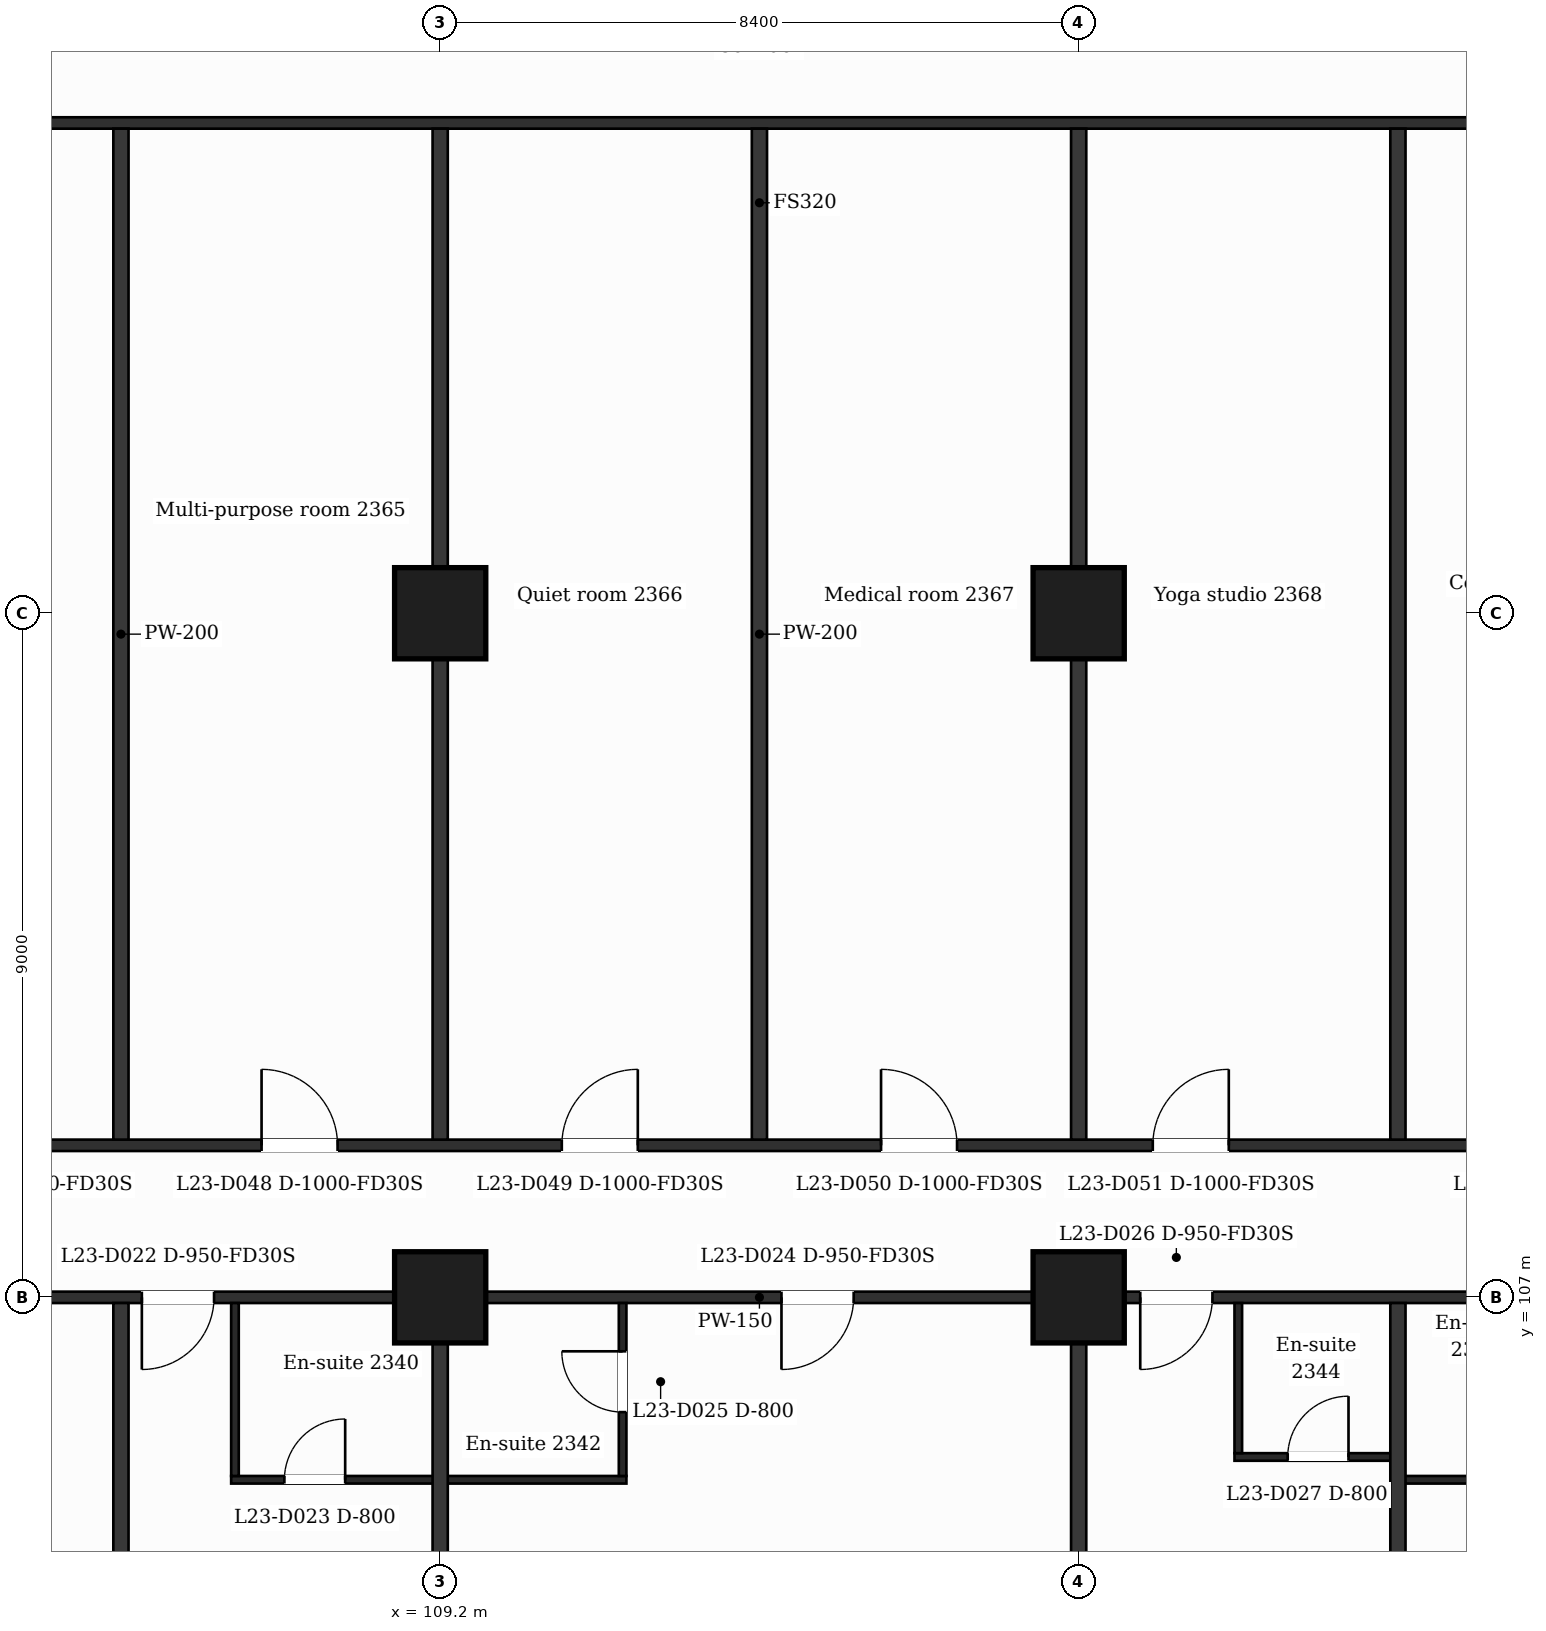
"""IFC4 building model, lengths in metres.
Left out: names, types, materials, properties, quantities, classifications, styles, units other than length and angle.
Written with IfcOpenShell. Run it as: python <this file> out.ifc"""

import sys

from ifc_helpers import new_model, si_unit, direction, frame, frame_2d, origin, origin_2d, place, context, subcontext, project, spatial, rectangle, extrude, element, fill, save


model = new_model("IFC4")
c1 = context("Model", 3, precision=1e-05, world=origin(), true_north=direction((0.0, 1.0)))
c2 = subcontext(c1, "Body", "Model", "MODEL_VIEW")
j1 = project(units=[si_unit("LENGTHUNIT", "METRE"), si_unit("PLANEANGLEUNIT", "RADIAN")], contexts=[c1])
p1 = place(None, origin())
s1 = spatial("IfcSite", under=j1, at=p1, CompositionType="ELEMENT")
p2 = place(p1, origin())
s2 = spatial("IfcBuilding", under=s1, at=p2, CompositionType="ELEMENT")
p3 = place(p2, frame((0.0, 0.0, 102.1)))
s3 = spatial("IfcBuildingStorey", under=s2, at=p3, CompositionType="ELEMENT", Elevation=102.1)
for number, where, z_axis, x_axis in (
    (1, (109.2, 107.0, 0.0), (0.0, 0.0, 1.0), (1.0, 0.0, 0.0)),
    (2, (117.6, 107.0, 0.0), (0.0, 0.0, 1.0), (1.0, 0.0, 0.0)),
    (3, (109.2, 116.0, 0.0), (0.0, 0.0, 1.0), (1.0, 0.0, 0.0)),
    (4, (117.6, 116.0, 0.0), (0.0, 0.0, 1.0), (1.0, 0.0, 0.0)),
):
    element("IfcColumn", number, at=place(p3, frame(where, z_axis=z_axis, x_axis=x_axis)), inside=s3, PredefinedType="COLUMN", context=c2, shape_type="SweptSolid", body=[
        extrude(rectangle(XDim=1.2, YDim=1.2, at=origin_2d()), origin(), (0.0, 0.0, 1.0), 3.7),
    ])
p4 = place(p3, frame((106.45, 104.6, 0.0), z_axis=(0.0, 0.0, 1.0), x_axis=(1.0, 0.0, 0.0)))
e5 = element("IfcWall", 5, at=p4, inside=s3, PredefinedType="PARTITIONING", context=c2, shape_type="SweptSolid", body=[
    extrude(rectangle(XDim=5.2, YDim=0.1, at=frame_2d((2.6, 0.0))), origin(), (0.0, 0.0, 1.0), 3.38),
])
p5 = place(p4, frame((0.7, 0.0, 0.0)))
e6 = element("IfcOpeningElement", 6, at=p5, cuts=e5, PredefinedType="OPENING", context=c2, shape_type="SweptSolid", body=[
    extrude(rectangle(XDim=0.8, YDim=2.1, at=frame_2d((0.4, 1.05))), frame((0.0, 0.06, 0.0), z_axis=(0.0, -1.0, 0.0), x_axis=(1.0, 0.0, 0.0)), (0.0, 0.0, 1.0), 0.12),
])
p6 = place(p3, frame((121.8, 104.6, 0.0), z_axis=(0.0, 0.0, 1.0), x_axis=(1.0, 0.0, 0.0)))
e7 = element("IfcWall", 7, at=p6, inside=s3, PredefinedType="PARTITIONING", context=c2, shape_type="SweptSolid", body=[
    extrude(rectangle(XDim=1.85, YDim=0.1, at=frame_2d((0.925, 0.0))), origin(), (0.0, 0.0, 1.0), 3.38),
])
p7 = place(p3, frame((119.65, 104.9, 0.0), z_axis=(0.0, 0.0, 1.0), x_axis=(1.0, 0.0, 0.0)))
e8 = element("IfcWall", 8, at=p7, inside=s3, PredefinedType="PARTITIONING", context=c2, shape_type="SweptSolid", body=[
    extrude(rectangle(XDim=2.15, YDim=0.1, at=frame_2d((1.075, 0.0))), origin(), (0.0, 0.0, 1.0), 3.38),
])
p8 = place(p7, frame((0.7, 0.0, 0.0)))
e9 = element("IfcOpeningElement", 9, at=p8, cuts=e8, PredefinedType="OPENING", context=c2, shape_type="SweptSolid", body=[
    extrude(rectangle(XDim=0.8, YDim=2.1, at=frame_2d((0.4, 1.05))), frame((0.0, 0.06, 0.0), z_axis=(0.0, -1.0, 0.0), x_axis=(1.0, 0.0, 0.0)), (0.0, 0.0, 1.0), 0.12),
])
p9 = place(p3, frame((87.018, 107.0, 0.0), z_axis=(0.0, 0.0, 1.0), x_axis=(1.0, 0.0, 0.0)))
e10 = element("IfcWall", 10, at=p9, inside=s3, PredefinedType="PARTITIONING", context=c2, shape_type="SweptSolid", body=[
    extrude(rectangle(XDim=52.765, YDim=0.15, at=frame_2d((26.382, 0.0))), origin(), (0.0, 0.0, 1.0), 3.38),
])
p10 = place(p9, frame((1.276, 0.0, 0.0)))
e11 = element("IfcOpeningElement", 11, at=p10, cuts=e10, PredefinedType="OPENING", context=c2, shape_type="SweptSolid", body=[
    extrude(rectangle(XDim=0.95, YDim=2.1, at=frame_2d((0.475, 1.05))), frame((0.0, 0.085, 0.0), z_axis=(0.0, -1.0, 0.0), x_axis=(1.0, 0.0, 0.0)), (0.0, 0.0, 1.0), 0.17),
])
p11 = place(p9, frame((6.152, 0.0, 0.0)))
e12 = element("IfcOpeningElement", 12, at=p11, cuts=e10, PredefinedType="OPENING", context=c2, shape_type="SweptSolid", body=[
    extrude(rectangle(XDim=0.95, YDim=2.1, at=frame_2d((0.475, 1.05))), frame((0.0, 0.085, 0.0), z_axis=(0.0, -1.0, 0.0), x_axis=(1.0, 0.0, 0.0)), (0.0, 0.0, 1.0), 0.17),
])
p12 = place(p9, frame((14.59, 0.0, 0.0)))
e13 = element("IfcOpeningElement", 13, at=p12, cuts=e10, PredefinedType="OPENING", context=c2, shape_type="SweptSolid", body=[
    extrude(rectangle(XDim=0.95, YDim=2.1, at=frame_2d((0.475, 1.05))), frame((0.0, 0.085, 0.0), z_axis=(0.0, -1.0, 0.0), x_axis=(1.0, 0.0, 0.0)), (0.0, 0.0, 1.0), 0.17),
])
p13 = place(p9, frame((18.257, 0.0, 0.0)))
e14 = element("IfcOpeningElement", 14, at=p13, cuts=e10, PredefinedType="OPENING", context=c2, shape_type="SweptSolid", body=[
    extrude(rectangle(XDim=0.95, YDim=2.1, at=frame_2d((0.475, 1.05))), frame((0.0, 0.085, 0.0), z_axis=(0.0, -1.0, 0.0), x_axis=(1.0, 0.0, 0.0)), (0.0, 0.0, 1.0), 0.17),
])
p14 = place(p9, frame((26.672, 0.0, 0.0)))
e15 = element("IfcOpeningElement", 15, at=p14, cuts=e10, PredefinedType="OPENING", context=c2, shape_type="SweptSolid", body=[
    extrude(rectangle(XDim=0.95, YDim=2.1, at=frame_2d((0.475, 1.05))), frame((0.0, 0.085, 0.0), z_axis=(0.0, -1.0, 0.0), x_axis=(1.0, 0.0, 0.0)), (0.0, 0.0, 1.0), 0.17),
])
p15 = place(p9, frame((31.392, 0.0, 0.0)))
e16 = element("IfcOpeningElement", 16, at=p15, cuts=e10, PredefinedType="OPENING", context=c2, shape_type="SweptSolid", body=[
    extrude(rectangle(XDim=0.95, YDim=2.1, at=frame_2d((0.475, 1.05))), frame((0.0, 0.085, 0.0), z_axis=(0.0, -1.0, 0.0), x_axis=(1.0, 0.0, 0.0)), (0.0, 0.0, 1.0), 0.17),
])
p16 = place(p9, frame((37.182, 0.0, 0.0)))
e17 = element("IfcOpeningElement", 17, at=p16, cuts=e10, PredefinedType="OPENING", context=c2, shape_type="SweptSolid", body=[
    extrude(rectangle(XDim=0.95, YDim=2.1, at=frame_2d((0.475, 1.05))), frame((0.0, 0.085, 0.0), z_axis=(0.0, -1.0, 0.0), x_axis=(1.0, 0.0, 0.0)), (0.0, 0.0, 1.0), 0.17),
])
p17 = place(p9, frame((41.762, 0.0, 0.0)))
e18 = element("IfcOpeningElement", 18, at=p17, cuts=e10, PredefinedType="OPENING", context=c2, shape_type="SweptSolid", body=[
    extrude(rectangle(XDim=0.95, YDim=2.1, at=frame_2d((0.475, 1.05))), frame((0.0, 0.085, 0.0), z_axis=(0.0, -1.0, 0.0), x_axis=(1.0, 0.0, 0.0)), (0.0, 0.0, 1.0), 0.17),
])
p18 = place(p9, frame((49.285, 0.0, 0.0)))
e19 = element("IfcOpeningElement", 19, at=p18, cuts=e10, PredefinedType="OPENING", context=c2, shape_type="SweptSolid", body=[
    extrude(rectangle(XDim=0.95, YDim=2.1, at=frame_2d((0.475, 1.05))), frame((0.0, 0.085, 0.0), z_axis=(0.0, -1.0, 0.0), x_axis=(1.0, 0.0, 0.0)), (0.0, 0.0, 1.0), 0.17),
])
p19 = place(p3, frame((100.725, 109.0, 0.0), z_axis=(0.0, 0.0, 1.0), x_axis=(1.0, 0.0, 0.0)))
e20 = element("IfcWall", 20, at=p19, inside=s3, PredefinedType="PARTITIONING", context=c2, shape_type="SweptSolid", body=[
    extrude(rectangle(XDim=25.35, YDim=0.15, at=frame_2d((12.675, 0.0))), origin(), (0.0, 0.0, 1.0), 3.38),
])
p20 = place(p19, frame((2.3, 0.0, 0.0)))
e21 = element("IfcOpeningElement", 21, at=p20, cuts=e20, PredefinedType="OPENING", context=c2, shape_type="SweptSolid", body=[
    extrude(rectangle(XDim=1.0, YDim=2.1, at=frame_2d((0.5, 1.05))), frame((0.0, 0.085, 0.0), z_axis=(0.0, -1.0, 0.0), x_axis=(1.0, 0.0, 0.0)), (0.0, 0.0, 1.0), 0.17),
])
p21 = place(p19, frame((6.125, 0.0, 0.0)))
e22 = element("IfcOpeningElement", 22, at=p21, cuts=e20, PredefinedType="OPENING", context=c2, shape_type="SweptSolid", body=[
    extrude(rectangle(XDim=1.0, YDim=2.1, at=frame_2d((0.5, 1.05))), frame((0.0, 0.085, 0.0), z_axis=(0.0, -1.0, 0.0), x_axis=(1.0, 0.0, 0.0)), (0.0, 0.0, 1.0), 0.17),
])
p22 = place(p19, frame((10.075, 0.0, 0.0)))
e23 = element("IfcOpeningElement", 23, at=p22, cuts=e20, PredefinedType="OPENING", context=c2, shape_type="SweptSolid", body=[
    extrude(rectangle(XDim=1.0, YDim=2.1, at=frame_2d((0.5, 1.05))), frame((0.0, 0.085, 0.0), z_axis=(0.0, -1.0, 0.0), x_axis=(1.0, 0.0, 0.0)), (0.0, 0.0, 1.0), 0.17),
])
p23 = place(p19, frame((14.275, 0.0, 0.0)))
e24 = element("IfcOpeningElement", 24, at=p23, cuts=e20, PredefinedType="OPENING", context=c2, shape_type="SweptSolid", body=[
    extrude(rectangle(XDim=1.0, YDim=2.1, at=frame_2d((0.5, 1.05))), frame((0.0, 0.085, 0.0), z_axis=(0.0, -1.0, 0.0), x_axis=(1.0, 0.0, 0.0)), (0.0, 0.0, 1.0), 0.17),
])
p24 = place(p19, frame((17.85, 0.0, 0.0)))
e25 = element("IfcOpeningElement", 25, at=p24, cuts=e20, PredefinedType="OPENING", context=c2, shape_type="SweptSolid", body=[
    extrude(rectangle(XDim=1.0, YDim=2.1, at=frame_2d((0.5, 1.05))), frame((0.0, 0.085, 0.0), z_axis=(0.0, -1.0, 0.0), x_axis=(1.0, 0.0, 0.0)), (0.0, 0.0, 1.0), 0.17),
])
p25 = place(p19, frame((22.925, 0.0, 0.0)))
e26 = element("IfcOpeningElement", 26, at=p25, cuts=e20, PredefinedType="OPENING", context=c2, shape_type="SweptSolid", body=[
    extrude(rectangle(XDim=1.0, YDim=2.1, at=frame_2d((0.5, 1.05))), frame((0.0, 0.085, 0.0), z_axis=(0.0, -1.0, 0.0), x_axis=(1.0, 0.0, 0.0)), (0.0, 0.0, 1.0), 0.17),
])
p26 = place(p3, frame((100.8, 122.45, 0.0), z_axis=(0.0, 0.0, 1.0), x_axis=(1.0, 0.0, 0.0)))
e27 = element("IfcWall", 27, at=p26, inside=s3, PredefinedType="PARTITIONING", context=c2, shape_type="SweptSolid", body=[
    extrude(rectangle(XDim=25.2, YDim=0.15, at=frame_2d((12.6, 0.0))), origin(), (0.0, 0.0, 1.0), 3.38),
])
p27 = place(p3, frame((105.0, 99.79, 0.0), z_axis=(0.0, 0.0, 1.0), x_axis=(0.0, 1.0, 0.0)))
e28 = element("IfcWall", 28, at=p27, inside=s3, PredefinedType="PARTITIONING", context=c2, shape_type="SweptSolid", body=[
    extrude(rectangle(XDim=7.135, YDim=0.2, at=frame_2d((3.567, 0.0))), origin(), (0.0, 0.0, 1.0), 3.38),
])
p28 = place(p3, frame((105.0, 109.075, 0.0), z_axis=(0.0, 0.0, 1.0), x_axis=(0.0, 1.0, 0.0)))
e29 = element("IfcWall", 29, at=p28, inside=s3, PredefinedType="PARTITIONING", context=c2, shape_type="SweptSolid", body=[
    extrude(rectangle(XDim=13.3, YDim=0.2, at=frame_2d((6.65, 0.0))), origin(), (0.0, 0.0, 1.0), 3.38),
])
p29 = place(p3, frame((106.5, 104.65, 0.0), z_axis=(0.0, 0.0, 1.0), x_axis=(0.0, 1.0, 0.0)))
e30 = element("IfcWall", 30, at=p29, inside=s3, PredefinedType="PARTITIONING", context=c2, shape_type="SweptSolid", body=[
    extrude(rectangle(XDim=2.275, YDim=0.1, at=frame_2d((1.138, 0.0))), origin(), (0.0, 0.0, 1.0), 3.38),
])
p30 = place(p3, frame((109.2, 99.79, 0.0), z_axis=(0.0, 0.0, 1.0), x_axis=(0.0, 1.0, 0.0)))
e31 = element("IfcWall", 31, at=p30, inside=s3, PredefinedType="PARTITIONING", context=c2, shape_type="SweptSolid", body=[
    extrude(rectangle(XDim=7.135, YDim=0.2, at=frame_2d((3.567, 0.0))), origin(), (0.0, 0.0, 1.0), 3.38),
])
p31 = place(p3, frame((109.2, 109.075, 0.0), z_axis=(0.0, 0.0, 1.0), x_axis=(0.0, 1.0, 0.0)))
e32 = element("IfcWall", 32, at=p31, inside=s3, PredefinedType="PARTITIONING", context=c2, shape_type="SweptSolid", body=[
    extrude(rectangle(XDim=13.3, YDim=0.2, at=frame_2d((6.65, 0.0))), origin(), (0.0, 0.0, 1.0), 3.38),
])
p32 = place(p3, frame((111.6, 104.65, 0.0), z_axis=(0.0, 0.0, 1.0), x_axis=(0.0, 1.0, 0.0)))
e33 = element("IfcWall", 33, at=p32, inside=s3, PredefinedType="PARTITIONING", context=c2, shape_type="SweptSolid", body=[
    extrude(rectangle(XDim=2.275, YDim=0.1, at=frame_2d((1.138, 0.0))), origin(), (0.0, 0.0, 1.0), 3.38),
])
p33 = place(p32, frame((0.84, 0.0, 0.0)))
e34 = element("IfcOpeningElement", 34, at=p33, cuts=e33, PredefinedType="OPENING", context=c2, shape_type="SweptSolid", body=[
    extrude(rectangle(XDim=0.8, YDim=2.1, at=frame_2d((0.4, 1.05))), frame((0.0, 0.06, 0.0), z_axis=(0.0, -1.0, 0.0), x_axis=(1.0, 0.0, 0.0)), (0.0, 0.0, 1.0), 0.12),
])
p34 = place(p3, frame((113.4, 109.075, 0.0), z_axis=(0.0, 0.0, 1.0), x_axis=(0.0, 1.0, 0.0)))
e35 = element("IfcWall", 35, at=p34, inside=s3, PredefinedType="PARTITIONING", context=c2, shape_type="SweptSolid", body=[
    extrude(rectangle(XDim=13.3, YDim=0.2, at=frame_2d((6.65, 0.0))), origin(), (0.0, 0.0, 1.0), 3.38),
])
p35 = place(p3, frame((117.6, 99.79, 0.0), z_axis=(0.0, 0.0, 1.0), x_axis=(0.0, 1.0, 0.0)))
e36 = element("IfcWall", 36, at=p35, inside=s3, PredefinedType="PARTITIONING", context=c2, shape_type="SweptSolid", body=[
    extrude(rectangle(XDim=7.135, YDim=0.2, at=frame_2d((3.567, 0.0))), origin(), (0.0, 0.0, 1.0), 3.38),
])
p36 = place(p3, frame((117.6, 109.075, 0.0), z_axis=(0.0, 0.0, 1.0), x_axis=(0.0, 1.0, 0.0)))
e37 = element("IfcWall", 37, at=p36, inside=s3, PredefinedType="PARTITIONING", context=c2, shape_type="SweptSolid", body=[
    extrude(rectangle(XDim=13.3, YDim=0.2, at=frame_2d((6.65, 0.0))), origin(), (0.0, 0.0, 1.0), 3.38),
])
p37 = place(p3, frame((119.7, 104.95, 0.0), z_axis=(0.0, 0.0, 1.0), x_axis=(0.0, 1.0, 0.0)))
e38 = element("IfcWall", 38, at=p37, inside=s3, PredefinedType="PARTITIONING", context=c2, shape_type="SweptSolid", body=[
    extrude(rectangle(XDim=1.975, YDim=0.1, at=frame_2d((0.988, 0.0))), origin(), (0.0, 0.0, 1.0), 3.38),
])
p38 = place(p3, frame((121.8, 99.79, 0.0), z_axis=(0.0, 0.0, 1.0), x_axis=(0.0, 1.0, 0.0)))
e39 = element("IfcWall", 39, at=p38, inside=s3, PredefinedType="PARTITIONING", context=c2, shape_type="SweptSolid", body=[
    extrude(rectangle(XDim=7.135, YDim=0.2, at=frame_2d((3.567, 0.0))), origin(), (0.0, 0.0, 1.0), 3.38),
])
p39 = place(p3, frame((121.8, 109.075, 0.0), z_axis=(0.0, 0.0, 1.0), x_axis=(0.0, 1.0, 0.0)))
e40 = element("IfcWall", 40, at=p39, inside=s3, PredefinedType="PARTITIONING", context=c2, shape_type="SweptSolid", body=[
    extrude(rectangle(XDim=13.3, YDim=0.2, at=frame_2d((6.65, 0.0))), origin(), (0.0, 0.0, 1.0), 3.38),
])
p40 = place(p13, origin())
e41 = element("IfcDoor", 41, at=p40, inside=s3, OperationType="SINGLE_SWING_LEFT", PredefinedType="DOOR", context=c2, shape_type="SweptSolid", body=[
    extrude(rectangle(XDim=0.95, YDim=2.1, at=frame_2d((0.475, 1.05))), frame((0.0, 0.025, 0.0), z_axis=(0.0, -1.0, 0.0), x_axis=(1.0, 0.0, 0.0)), (0.0, 0.0, 1.0), 0.05),
])
fill(e14, e41)
p41 = place(p5, origin())
e42 = element("IfcDoor", 42, at=p41, inside=s3, OperationType="SINGLE_SWING_RIGHT", PredefinedType="DOOR", context=c2, shape_type="SweptSolid", body=[
    extrude(rectangle(XDim=0.8, YDim=2.1, at=frame_2d((0.4, 1.05))), frame((0.0, 0.025, 0.0), z_axis=(0.0, -1.0, 0.0), x_axis=(1.0, 0.0, 0.0)), (0.0, 0.0, 1.0), 0.05),
])
fill(e6, e42)
p42 = place(p14, origin())
e43 = element("IfcDoor", 43, at=p42, inside=s3, OperationType="SINGLE_SWING_LEFT", PredefinedType="DOOR", context=c2, shape_type="SweptSolid", body=[
    extrude(rectangle(XDim=0.95, YDim=2.1, at=frame_2d((0.475, 1.05))), frame((0.0, 0.025, 0.0), z_axis=(0.0, -1.0, 0.0), x_axis=(1.0, 0.0, 0.0)), (0.0, 0.0, 1.0), 0.05),
])
fill(e15, e43)
p43 = place(p33, origin())
e44 = element("IfcDoor", 44, at=p43, inside=s3, OperationType="SINGLE_SWING_RIGHT", PredefinedType="DOOR", context=c2, shape_type="SweptSolid", body=[
    extrude(rectangle(XDim=0.8, YDim=2.1, at=frame_2d((0.4, 1.05))), frame((0.0, 0.025, 0.0), z_axis=(0.0, -1.0, 0.0), x_axis=(1.0, 0.0, 0.0)), (0.0, 0.0, 1.0), 0.05),
])
fill(e34, e44)
p44 = place(p15, origin())
e45 = element("IfcDoor", 45, at=p44, inside=s3, OperationType="SINGLE_SWING_LEFT", PredefinedType="DOOR", context=c2, shape_type="SweptSolid", body=[
    extrude(rectangle(XDim=0.95, YDim=2.1, at=frame_2d((0.475, 1.05))), frame((0.0, 0.025, 0.0), z_axis=(0.0, -1.0, 0.0), x_axis=(1.0, 0.0, 0.0)), (0.0, 0.0, 1.0), 0.05),
])
fill(e16, e45)
p45 = place(p8, origin())
e46 = element("IfcDoor", 46, at=p45, inside=s3, OperationType="SINGLE_SWING_RIGHT", PredefinedType="DOOR", context=c2, shape_type="SweptSolid", body=[
    extrude(rectangle(XDim=0.8, YDim=2.1, at=frame_2d((0.4, 1.05))), frame((0.0, 0.025, 0.0), z_axis=(0.0, -1.0, 0.0), x_axis=(1.0, 0.0, 0.0)), (0.0, 0.0, 1.0), 0.05),
])
fill(e9, e46)
p46 = place(p21, origin())
e47 = element("IfcDoor", 47, at=p46, inside=s3, OperationType="SINGLE_SWING_LEFT", PredefinedType="DOOR", context=c2, shape_type="SweptSolid", body=[
    extrude(rectangle(XDim=1.0, YDim=2.1, at=frame_2d((0.5, 1.05))), frame((0.0, 0.025, 0.0), z_axis=(0.0, -1.0, 0.0), x_axis=(1.0, 0.0, 0.0)), (0.0, 0.0, 1.0), 0.05),
])
fill(e22, e47)
p47 = place(p22, origin())
e48 = element("IfcDoor", 48, at=p47, inside=s3, OperationType="SINGLE_SWING_RIGHT", PredefinedType="DOOR", context=c2, shape_type="SweptSolid", body=[
    extrude(rectangle(XDim=1.0, YDim=2.1, at=frame_2d((0.5, 1.05))), frame((0.0, 0.025, 0.0), z_axis=(0.0, -1.0, 0.0), x_axis=(1.0, 0.0, 0.0)), (0.0, 0.0, 1.0), 0.05),
])
fill(e23, e48)
p48 = place(p23, origin())
e49 = element("IfcDoor", 49, at=p48, inside=s3, OperationType="SINGLE_SWING_LEFT", PredefinedType="DOOR", context=c2, shape_type="SweptSolid", body=[
    extrude(rectangle(XDim=1.0, YDim=2.1, at=frame_2d((0.5, 1.05))), frame((0.0, 0.025, 0.0), z_axis=(0.0, -1.0, 0.0), x_axis=(1.0, 0.0, 0.0)), (0.0, 0.0, 1.0), 0.05),
])
fill(e24, e49)
p49 = place(p24, origin())
e50 = element("IfcDoor", 50, at=p49, inside=s3, OperationType="SINGLE_SWING_RIGHT", PredefinedType="DOOR", context=c2, shape_type="SweptSolid", body=[
    extrude(rectangle(XDim=1.0, YDim=2.1, at=frame_2d((0.5, 1.05))), frame((0.0, 0.025, 0.0), z_axis=(0.0, -1.0, 0.0), x_axis=(1.0, 0.0, 0.0)), (0.0, 0.0, 1.0), 0.05),
])
fill(e25, e50)
save(model, sys.argv[1])
